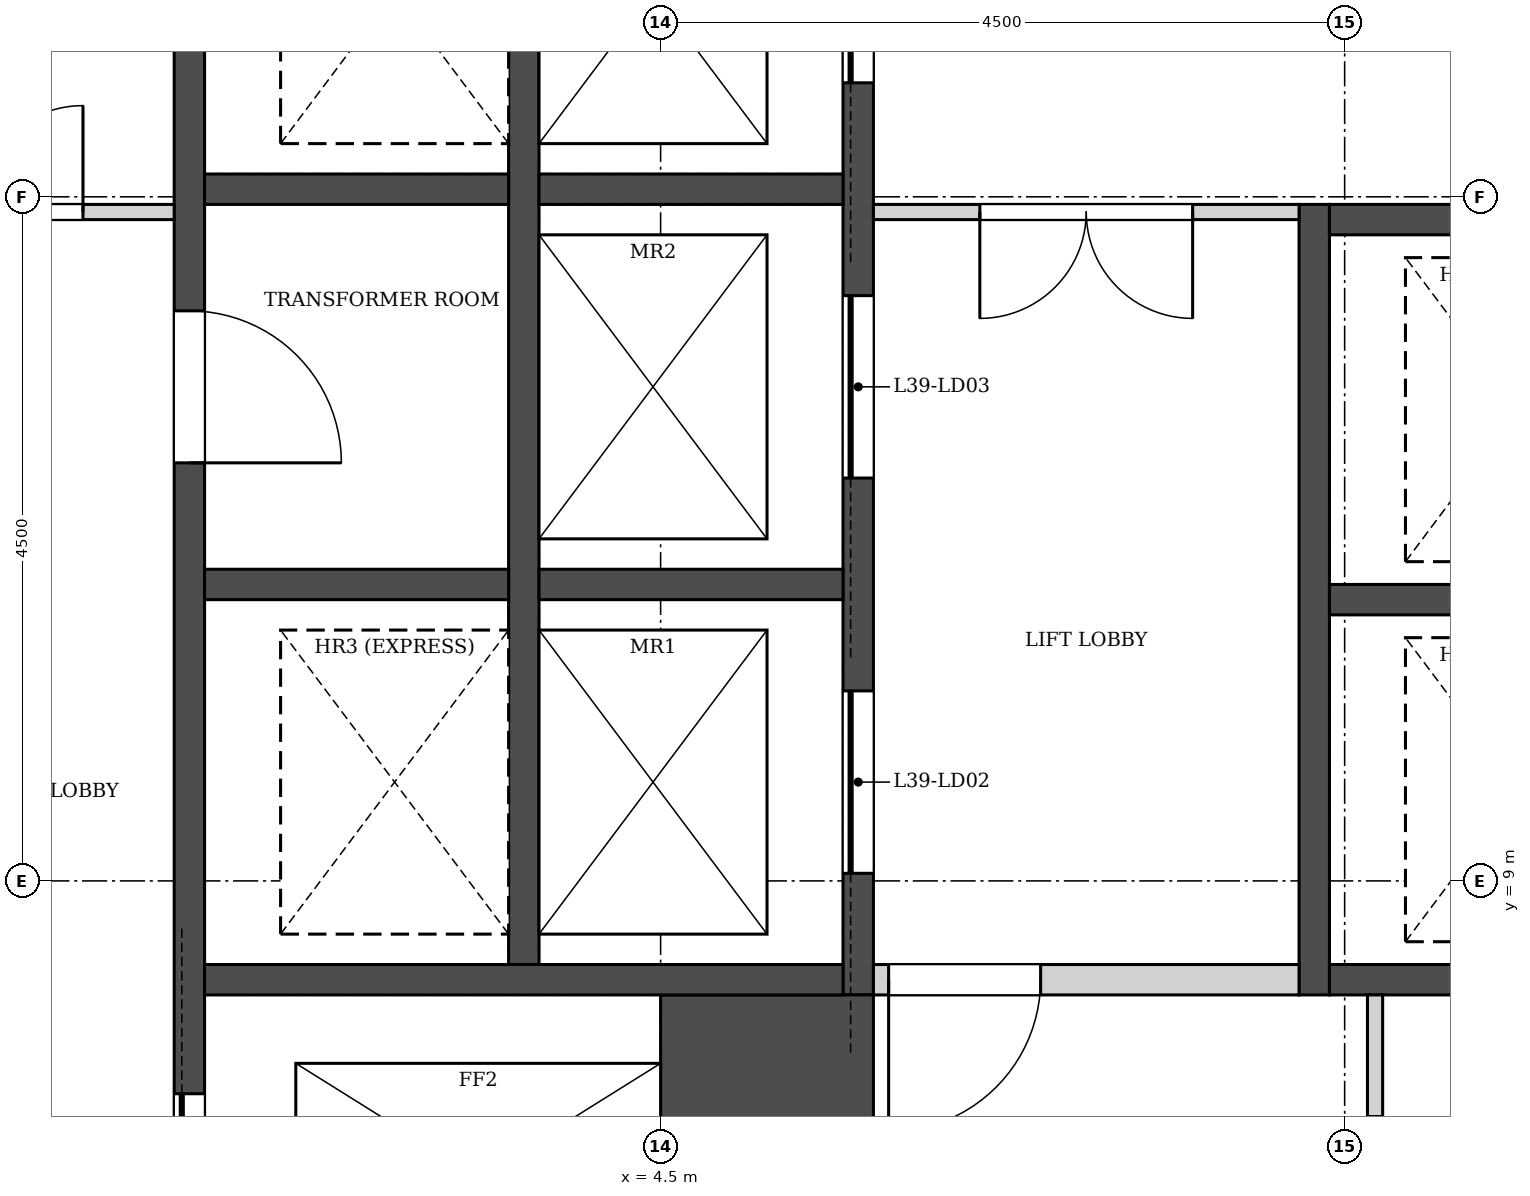
"""IFC4 building model, lengths in metres.
Left out: names, types, materials, properties, quantities, classifications, styles, units other than length and angle.
Written with IfcOpenShell. Run it as: python <this file> out.ifc"""

import sys

from ifc_helpers import new_model, si_unit, direction, frame, frame_2d, origin, place, context, subcontext, project, spatial, rectangle, extrude, element, fill, save


model = new_model("IFC4")
c1 = context("Model", 3, precision=1e-05, world=origin(), true_north=direction((0.0, 1.0)))
c2 = subcontext(c1, "Body", "Model", "MODEL_VIEW")
j1 = project(units=[si_unit("LENGTHUNIT", "METRE"), si_unit("PLANEANGLEUNIT", "RADIAN")], contexts=[c1])
p1 = place(None, origin())
s1 = spatial("IfcSite", under=j1, at=p1, CompositionType="ELEMENT")
p2 = place(p1, origin())
s2 = spatial("IfcBuilding", under=s1, at=p2, CompositionType="ELEMENT")
p3 = place(p2, frame((0.0, 0.0, 174.9)))
s3 = spatial("IfcBuildingStorey", under=s2, at=p3, CompositionType="ELEMENT", Elevation=174.9)
p4 = place(p3, frame((13.281, 10.699, 0.0), z_axis=(0.0, 0.0, 1.0), x_axis=(-0.499998513025, 0.866026262288, 0.0)))
e1 = element("IfcWall", 1, at=p4, inside=s3, PredefinedType="SHEAR", context=c2, shape_type="SweptSolid", body=[
    extrude(rectangle(XDim=9.008, YDim=1.2, at=frame_2d((4.504, 0.0))), origin(), (0.0, 0.0, 1.0), 7.2),
])
p5 = place(p3, frame((28.257, 7.709, 0.0), z_axis=(0.0, 0.0, 1.0), x_axis=(-0.500002420408, 0.866024006357, 0.0)))
e2 = element("IfcWall", 2, at=p5, inside=s3, PredefinedType="SOLIDWALL", context=c2, shape_type="SweptSolid", body=[
    extrude(rectangle(XDim=47.807, YDim=0.34, at=frame_2d((23.904, 0.0))), origin(), (0.0, 0.0, 1.0), 6.8),
])
p6 = place(p5, frame((32.452, 0.0, 0.9)))
e3 = element("IfcOpeningElement", 3, at=p6, cuts=e2, PredefinedType="OPENING", context=c2, shape_type="SweptSolid", body=[
    extrude(rectangle(XDim=1.885, YDim=3.0, at=frame_2d((0.942, 1.5))), frame((0.0, 0.18, 0.0), z_axis=(0.0, -1.0, 0.0), x_axis=(1.0, 0.0, 0.0)), (0.0, 0.0, 1.0), 0.36),
])
p7 = place(p5, frame((38.452, 0.0, 0.9)))
e4 = element("IfcOpeningElement", 4, at=p7, cuts=e2, PredefinedType="OPENING", context=c2, shape_type="SweptSolid", body=[
    extrude(rectangle(XDim=1.885, YDim=3.0, at=frame_2d((0.942, 1.5))), frame((0.0, 0.18, 0.0), z_axis=(0.0, -1.0, 0.0), x_axis=(1.0, 0.0, 0.0)), (0.0, 0.0, 1.0), 0.36),
])
p8 = place(p5, frame((44.452, 0.0, 0.9)))
e5 = element("IfcOpeningElement", 5, at=p8, cuts=e2, PredefinedType="OPENING", context=c2, shape_type="SweptSolid", body=[
    extrude(rectangle(XDim=1.885, YDim=3.0, at=frame_2d((0.942, 1.5))), frame((0.0, 0.18, 0.0), z_axis=(0.0, -1.0, 0.0), x_axis=(1.0, 0.0, 0.0)), (0.0, 0.0, 1.0), 0.36),
])
p9 = place(p3, frame((8.8, 8.25, -0.4), z_axis=(0.0, 0.0, 1.0), x_axis=(0.0, 1.0, 0.0)))
e6 = element("IfcWall", 6, at=p9, inside=s3, PredefinedType="SOLIDWALL", context=c2, shape_type="SweptSolid", body=[
    extrude(rectangle(XDim=5.2, YDim=0.2, at=frame_2d((2.6, 0.0))), origin(), (0.0, 0.0, 1.0), 7.2),
])
p10 = place(p3, frame((5.8, 8.25, -0.4), z_axis=(0.0, 0.0, 1.0), x_axis=(0.0, 1.0, 0.0)))
e7 = element("IfcWall", 7, at=p10, inside=s3, PredefinedType="SOLIDWALL", context=c2, shape_type="SweptSolid", body=[
    extrude(rectangle(XDim=8.0, YDim=0.2, at=frame_2d((4.0, 0.0))), origin(), (0.0, 0.0, 1.0), 7.2),
])
p11 = place(p10, frame((0.8, 0.0, 0.4)))
e8 = element("IfcOpeningElement", 8, at=p11, cuts=e7, PredefinedType="OPENING", context=c2, shape_type="SweptSolid", body=[
    extrude(rectangle(XDim=1.2, YDim=2.1, at=frame_2d((0.6, 1.05))), frame((0.0, 0.11, 0.0), z_axis=(0.0, -1.0, 0.0), x_axis=(1.0, 0.0, 0.0)), (0.0, 0.0, 1.0), 0.22),
])
p12 = place(p10, frame((3.4, 0.0, 0.4)))
e9 = element("IfcOpeningElement", 9, at=p12, cuts=e7, PredefinedType="OPENING", context=c2, shape_type="SweptSolid", body=[
    extrude(rectangle(XDim=1.2, YDim=2.1, at=frame_2d((0.6, 1.05))), frame((0.0, 0.11, 0.0), z_axis=(0.0, -1.0, 0.0), x_axis=(1.0, 0.0, 0.0)), (0.0, 0.0, 1.0), 0.22),
])
p13 = place(p10, frame((6.0, 0.0, 0.4)))
e10 = element("IfcOpeningElement", 10, at=p13, cuts=e7, PredefinedType="OPENING", context=c2, shape_type="SweptSolid", body=[
    extrude(rectangle(XDim=1.2, YDim=2.1, at=frame_2d((0.6, 1.05))), frame((0.0, 0.11, 0.0), z_axis=(0.0, -1.0, 0.0), x_axis=(1.0, 0.0, 0.0)), (0.0, 0.0, 1.0), 0.22),
])
p14 = place(p3, frame((3.6, 8.45, -0.4), z_axis=(0.0, 0.0, 1.0), x_axis=(0.0, 1.0, 0.0)))
e11 = element("IfcWall", 11, at=p14, inside=s3, PredefinedType="SOLIDWALL", context=c2, shape_type="SweptSolid", body=[
    extrude(rectangle(XDim=7.8, YDim=0.2, at=frame_2d((3.9, 0.0))), origin(), (0.0, 0.0, 1.0), 7.2),
])
p15 = place(p3, frame((1.4, 5.85, -0.4), z_axis=(0.0, 0.0, 1.0), x_axis=(0.0, 1.0, 0.0)))
e12 = element("IfcWall", 12, at=p15, inside=s3, PredefinedType="SOLIDWALL", context=c2, shape_type="SweptSolid", body=[
    extrude(rectangle(XDim=11.75, YDim=0.2, at=frame_2d((5.875, 0.0))), origin(), (0.0, 0.0, 1.0), 7.2),
])
p16 = place(p15, frame((0.65, 0.0, 0.4)))
e13 = element("IfcOpeningElement", 13, at=p16, cuts=e12, PredefinedType="OPENING", context=c2, shape_type="SweptSolid", body=[
    extrude(rectangle(XDim=1.1, YDim=2.1, at=frame_2d((0.55, 1.05))), frame((0.0, 0.11, 0.0), z_axis=(0.0, -1.0, 0.0), x_axis=(1.0, 0.0, 0.0)), (0.0, 0.0, 1.0), 0.22),
])
p17 = place(p15, frame((5.9, 0.0, 0.4)))
e14 = element("IfcOpeningElement", 14, at=p17, cuts=e12, PredefinedType="OPENING", context=c2, shape_type="SweptSolid", body=[
    extrude(rectangle(XDim=1.0, YDim=2.1, at=frame_2d((0.5, 1.05))), frame((0.0, 0.11, 0.0), z_axis=(0.0, -1.0, 0.0), x_axis=(1.0, 0.0, 0.0)), (0.0, 0.0, 1.0), 0.22),
])
p18 = place(p3, frame((5.2, 5.85, -0.4), z_axis=(0.0, 0.0, 1.0), x_axis=(0.0, 1.0, 0.0)))
e15 = element("IfcWall", 15, at=p18, inside=s3, PredefinedType="SOLIDWALL", context=c2, shape_type="SweptSolid", body=[
    extrude(rectangle(XDim=2.4, YDim=1.4, at=frame_2d((1.2, 0.0))), origin(), (0.0, 0.0, 1.0), 7.2),
])
p19 = place(p3, frame((8.9, 8.35, -0.4), z_axis=(0.0, 0.0, 1.0), x_axis=(1.0, 0.0, 0.0)))
e16 = element("IfcWall", 16, at=p19, inside=s3, PredefinedType="SOLIDWALL", context=c2, shape_type="SweptSolid", body=[
    extrude(rectangle(XDim=2.0, YDim=0.2, at=frame_2d((1.0, 0.0))), origin(), (0.0, 0.0, 1.0), 7.2),
])
p20 = place(p3, frame((1.5, 8.35, -0.4), z_axis=(0.0, 0.0, 1.0), x_axis=(1.0, 0.0, 0.0)))
e17 = element("IfcWall", 17, at=p20, inside=s3, PredefinedType="SOLIDWALL", context=c2, shape_type="SweptSolid", body=[
    extrude(rectangle(XDim=4.2, YDim=0.2, at=frame_2d((2.1, 0.0))), origin(), (0.0, 0.0, 1.0), 7.2),
])
for number, where, z_axis, x_axis in (
    (18, (8.9, 10.85, -0.4), (0.0, 0.0, 1.0), (1.0, 0.0, 0.0)),
    (19, (8.9, 13.35, -0.4), (0.0, 0.0, 1.0), (1.0, 0.0, 0.0)),
    (20, (3.7, 10.95, -0.4), (0.0, 0.0, 1.0), (1.0, 0.0, 0.0)),
    (21, (3.7, 13.55, -0.4), (0.0, 0.0, 1.0), (1.0, 0.0, 0.0)),
    (22, (1.5, 10.95, -0.4), (0.0, 0.0, 1.0), (1.0, 0.0, 0.0)),
    (23, (1.5, 13.55, -0.4), (0.0, 0.0, 1.0), (1.0, 0.0, 0.0)),
):
    element("IfcWall", number, at=place(p3, frame(where, z_axis=z_axis, x_axis=x_axis)), inside=s3, PredefinedType="SOLIDWALL", context=c2, shape_type="SweptSolid", body=[
        extrude(rectangle(XDim=2.0, YDim=0.2, at=frame_2d((1.0, 0.0))), origin(), (0.0, 0.0, 1.0), 7.2),
    ])
p21 = place(p3, frame((5.9, 13.4, 0.0), z_axis=(0.0, 0.0, 1.0), x_axis=(1.0, 0.0, 0.0)))
e24 = element("IfcWall", 24, at=p21, inside=s3, PredefinedType="PARTITIONING", context=c2, shape_type="SweptSolid", body=[
    extrude(rectangle(XDim=2.8, YDim=0.1, at=frame_2d((1.4, 0.0))), origin(), (0.0, 0.0, 1.0), 6.8),
])
p22 = place(p21, frame((0.7, 0.0, 0.0)))
e25 = element("IfcOpeningElement", 25, at=p22, cuts=e24, PredefinedType="OPENING", context=c2, shape_type="SweptSolid", body=[
    extrude(rectangle(XDim=1.4, YDim=2.1, at=frame_2d((0.7, 1.05))), frame((0.0, 0.06, 0.0), z_axis=(0.0, -1.0, 0.0), x_axis=(1.0, 0.0, 0.0)), (0.0, 0.0, 1.0), 0.12),
])
p23 = place(p3, frame((9.2, 5.85, 0.0), z_axis=(0.0, 0.0, 1.0), x_axis=(0.0, 1.0, 0.0)))
e26 = element("IfcWall", 26, at=p23, inside=s3, PredefinedType="PARTITIONING", context=c2, shape_type="SweptSolid", body=[
    extrude(rectangle(XDim=2.4, YDim=0.1, at=frame_2d((1.2, 0.0))), origin(), (0.0, 0.0, 1.0), 6.8),
])
p24 = place(p23, frame((0.7, 0.0, 0.0)))
e27 = element("IfcOpeningElement", 27, at=p24, cuts=e26, PredefinedType="OPENING", context=c2, shape_type="SweptSolid", body=[
    extrude(rectangle(XDim=0.9, YDim=2.1, at=frame_2d((0.45, 1.05))), frame((0.0, 0.06, 0.0), z_axis=(0.0, -1.0, 0.0), x_axis=(1.0, 0.0, 0.0)), (0.0, 0.0, 1.0), 0.12),
])
p25 = place(p3, frame((5.9, 8.35, 0.0), z_axis=(0.0, 0.0, 1.0), x_axis=(1.0, 0.0, 0.0)))
e28 = element("IfcWall", 28, at=p25, inside=s3, PredefinedType="SOLIDWALL", context=c2, shape_type="SweptSolid", body=[
    extrude(rectangle(XDim=2.8, YDim=0.2, at=frame_2d((1.4, 0.0))), origin(), (0.0, 0.0, 1.0), 6.8),
])
p26 = place(p25, frame((0.1, 0.0, 0.0)))
e29 = element("IfcOpeningElement", 29, at=p26, cuts=e28, PredefinedType="OPENING", context=c2, shape_type="SweptSolid", body=[
    extrude(rectangle(XDim=1.0, YDim=2.1, at=frame_2d((0.5, 1.05))), frame((0.0, 0.11, 0.0), z_axis=(0.0, -1.0, 0.0), x_axis=(1.0, 0.0, 0.0)), (0.0, 0.0, 1.0), 0.22),
])
p27 = place(p3, frame((-1.3, 13.4, 0.0), z_axis=(0.0, 0.0, 1.0), x_axis=(1.0, 0.0, 0.0)))
e30 = element("IfcWall", 30, at=p27, inside=s3, PredefinedType="PARTITIONING", context=c2, shape_type="SweptSolid", body=[
    extrude(rectangle(XDim=2.6, YDim=0.1, at=frame_2d((1.3, 0.0))), origin(), (0.0, 0.0, 1.0), 6.8),
])
p28 = place(p27, frame((0.6, 0.0, 0.0)))
e31 = element("IfcOpeningElement", 31, at=p28, cuts=e30, PredefinedType="OPENING", context=c2, shape_type="SweptSolid", body=[
    extrude(rectangle(XDim=1.4, YDim=2.1, at=frame_2d((0.7, 1.05))), frame((0.0, 0.06, 0.0), z_axis=(0.0, -1.0, 0.0), x_axis=(1.0, 0.0, 0.0)), (0.0, 0.0, 1.0), 0.12),
])
p29 = place(p11, origin())
e32 = element("IfcDoor", 32, at=p29, inside=s3, OperationType="SLIDING_TO_LEFT", PredefinedType="DOOR", context=c2, shape_type="SweptSolid", body=[
    extrude(rectangle(XDim=1.2, YDim=2.1, at=frame_2d((0.6, 1.05))), frame((0.0, 0.025, 0.0), z_axis=(0.0, -1.0, 0.0), x_axis=(1.0, 0.0, 0.0)), (0.0, 0.0, 1.0), 0.05),
])
fill(e8, e32)
p30 = place(p12, origin())
e33 = element("IfcDoor", 33, at=p30, inside=s3, OperationType="SLIDING_TO_LEFT", PredefinedType="DOOR", context=c2, shape_type="SweptSolid", body=[
    extrude(rectangle(XDim=1.2, YDim=2.1, at=frame_2d((0.6, 1.05))), frame((0.0, 0.025, 0.0), z_axis=(0.0, -1.0, 0.0), x_axis=(1.0, 0.0, 0.0)), (0.0, 0.0, 1.0), 0.05),
])
fill(e9, e33)
p31 = place(p13, origin())
e34 = element("IfcDoor", 34, at=p31, inside=s3, OperationType="SLIDING_TO_LEFT", PredefinedType="DOOR", context=c2, shape_type="SweptSolid", body=[
    extrude(rectangle(XDim=1.2, YDim=2.1, at=frame_2d((0.6, 1.05))), frame((0.0, 0.025, 0.0), z_axis=(0.0, -1.0, 0.0), x_axis=(1.0, 0.0, 0.0)), (0.0, 0.0, 1.0), 0.05),
])
fill(e10, e34)
p32 = place(p16, origin())
e35 = element("IfcDoor", 35, at=p32, inside=s3, OperationType="SLIDING_TO_RIGHT", PredefinedType="DOOR", context=c2, shape_type="SweptSolid", body=[
    extrude(rectangle(XDim=1.1, YDim=2.1, at=frame_2d((0.55, 1.05))), frame((0.0, 0.025, 0.0), z_axis=(0.0, -1.0, 0.0), x_axis=(1.0, 0.0, 0.0)), (0.0, 0.0, 1.0), 0.05),
])
fill(e13, e35)
p33 = place(p17, frame((1.0, 0.0, 0.0), z_axis=(0.0, 0.0, 1.0), x_axis=(-1.0, 0.0, 0.0)))
e36 = element("IfcDoor", 36, at=p33, inside=s3, OperationType="SINGLE_SWING_RIGHT", PredefinedType="DOOR", context=c2, shape_type="SweptSolid", body=[
    extrude(rectangle(XDim=1.0, YDim=2.1, at=frame_2d((0.5, 1.05))), frame((0.0, 0.025, 0.0), z_axis=(0.0, -1.0, 0.0), x_axis=(1.0, 0.0, 0.0)), (0.0, 0.0, 1.0), 0.05),
])
fill(e14, e36)
p34 = place(p22, frame((1.4, 0.0, 0.0), z_axis=(0.0, 0.0, 1.0), x_axis=(-1.0, 0.0, 0.0)))
e37 = element("IfcDoor", 37, at=p34, inside=s3, OperationType="DOUBLE_DOOR_SINGLE_SWING", PredefinedType="DOOR", context=c2, shape_type="SweptSolid", body=[
    extrude(rectangle(XDim=1.4, YDim=2.1, at=frame_2d((0.7, 1.05))), frame((0.0, 0.025, 0.0), z_axis=(0.0, -1.0, 0.0), x_axis=(1.0, 0.0, 0.0)), (0.0, 0.0, 1.0), 0.05),
])
fill(e25, e37)
p35 = place(p26, frame((1.0, 0.0, 0.0), z_axis=(0.0, 0.0, 1.0), x_axis=(-1.0, 0.0, 0.0)))
e38 = element("IfcDoor", 38, at=p35, inside=s3, OperationType="SINGLE_SWING_RIGHT", PredefinedType="DOOR", context=c2, shape_type="SweptSolid", body=[
    extrude(rectangle(XDim=1.0, YDim=2.1, at=frame_2d((0.5, 1.05))), frame((0.0, 0.025, 0.0), z_axis=(0.0, -1.0, 0.0), x_axis=(1.0, 0.0, 0.0)), (0.0, 0.0, 1.0), 0.05),
])
fill(e29, e38)
p36 = place(p28, origin())
e39 = element("IfcDoor", 39, at=p36, inside=s3, OperationType="DOUBLE_DOOR_SINGLE_SWING", PredefinedType="DOOR", context=c2, shape_type="SweptSolid", body=[
    extrude(rectangle(XDim=1.4, YDim=2.1, at=frame_2d((0.7, 1.05))), frame((0.0, 0.025, 0.0), z_axis=(0.0, -1.0, 0.0), x_axis=(1.0, 0.0, 0.0)), (0.0, 0.0, 1.0), 0.05),
])
fill(e31, e39)
save(model, sys.argv[1])
